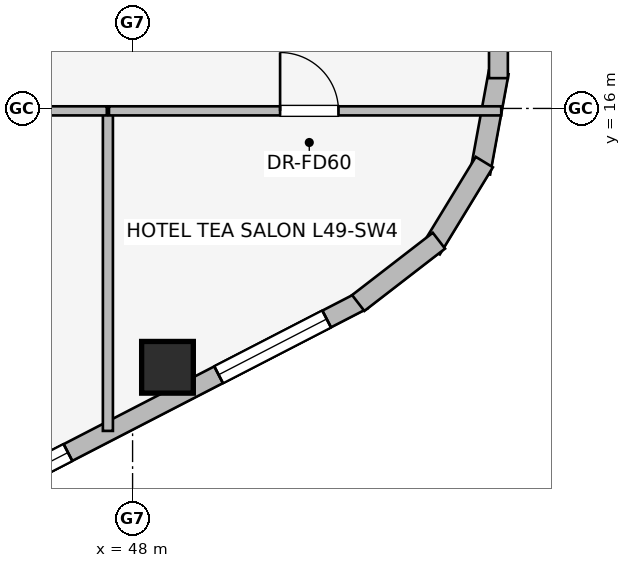
"""IFC4 building model, lengths in metres.
Left out: names, types, materials, properties, quantities, classifications, styles, units other than length and angle.
Written with IfcOpenShell. Run it as: python <this file> out.ifc"""

import sys

from ifc_helpers import new_model, si_unit, direction, frame, frame_2d, origin, origin_2d, place, context, subcontext, project, spatial, rectangle, extrude, element, fill, save


model = new_model("IFC4")
c1 = context("Model", 3, precision=1e-05, world=origin(), true_north=direction((0.0, 1.0)))
c2 = subcontext(c1, "Body", "Model", "MODEL_VIEW")
j1 = project(units=[si_unit("LENGTHUNIT", "METRE"), si_unit("PLANEANGLEUNIT", "RADIAN")], contexts=[c1])
p1 = place(None, origin())
s1 = spatial("IfcSite", under=j1, at=p1, CompositionType="ELEMENT")
p2 = place(p1, origin())
s2 = spatial("IfcBuilding", under=s1, at=p2, CompositionType="ELEMENT")
p3 = place(p2, frame((0.0, 0.0, 180.9)))
s3 = spatial("IfcBuildingStorey", under=s2, at=p3, CompositionType="ELEMENT", Elevation=180.9)
p4 = place(p3, frame((48.574, 11.743, 0.0), z_axis=(0.0, 0.0, 1.0), x_axis=(1.0, 0.0, 0.0)))
e1 = element("IfcColumn", 1, at=p4, inside=s3, PredefinedType="COLUMN", context=c2, shape_type="SweptSolid", body=[
    extrude(rectangle(XDim=0.85, YDim=0.85, at=origin_2d()), origin(), (0.0, 0.0, 1.0), 3.45),
])
p5 = place(p3, frame((51.792, 12.847, 0.0), z_axis=(0.0, 0.0, 1.0), x_axis=(-0.888626188278, -0.458632202867, 0.0)))
e2 = element("IfcWall", 2, at=p5, inside=s3, PredefinedType="STANDARD", context=c2, shape_type="SweptSolid", body=[
    extrude(rectangle(XDim=16.828, YDim=0.31, at=frame_2d((8.414, 0.0))), origin(), (0.0, 0.0, 1.0), 3.19),
])
p6 = place(p5, frame((0.675, 0.0, 0.75)))
e3 = element("IfcOpeningElement", 3, at=p6, cuts=e2, PredefinedType="OPENING", context=c2, shape_type="SweptSolid", body=[
    extrude(rectangle(XDim=2.0, YDim=1.5, at=frame_2d((1.0, 0.75))), frame((0.0, 0.165, 0.0), z_axis=(0.0, -1.0, 0.0), x_axis=(1.0, 0.0, 0.0)), (0.0, 0.0, 1.0), 0.33),
])
p7 = place(p5, frame((5.463, 0.0, 0.75)))
e4 = element("IfcOpeningElement", 4, at=p7, cuts=e2, PredefinedType="OPENING", context=c2, shape_type="SweptSolid", body=[
    extrude(rectangle(XDim=1.35, YDim=1.45, at=frame_2d((0.675, 0.725))), frame((0.0, 0.165, 0.0), z_axis=(0.0, -1.0, 0.0), x_axis=(1.0, 0.0, 0.0)), (0.0, 0.0, 1.0), 0.33),
])
p8 = place(p5, frame((7.58, 0.0, 0.75)))
e5 = element("IfcOpeningElement", 5, at=p8, cuts=e2, PredefinedType="OPENING", context=c2, shape_type="SweptSolid", body=[
    extrude(rectangle(XDim=1.35, YDim=1.45, at=frame_2d((0.675, 0.725))), frame((0.0, 0.165, 0.0), z_axis=(0.0, -1.0, 0.0), x_axis=(1.0, 0.0, 0.0)), (0.0, 0.0, 1.0), 0.33),
])
p9 = place(p5, frame((9.698, 0.0, 0.75)))
e6 = element("IfcOpeningElement", 6, at=p9, cuts=e2, PredefinedType="OPENING", context=c2, shape_type="SweptSolid", body=[
    extrude(rectangle(XDim=1.35, YDim=1.45, at=frame_2d((0.675, 0.725))), frame((0.0, 0.165, 0.0), z_axis=(0.0, -1.0, 0.0), x_axis=(1.0, 0.0, 0.0)), (0.0, 0.0, 1.0), 0.33),
])
p10 = place(p5, frame((14.563, 0.0, 0.75)))
e7 = element("IfcOpeningElement", 7, at=p10, cuts=e2, PredefinedType="OPENING", context=c2, shape_type="SweptSolid", body=[
    extrude(rectangle(XDim=1.05, YDim=1.4, at=frame_2d((0.525, 0.7))), frame((0.0, 0.165, 0.0), z_axis=(0.0, -1.0, 0.0), x_axis=(1.0, 0.0, 0.0)), (0.0, 0.0, 1.0), 0.33),
])
p11 = place(p3, frame((54.021, 16.592, 0.0), z_axis=(0.0, 0.0, 1.0), x_axis=(-0.180717642671, -0.983535019014, 0.0)))
e8 = element("IfcWall", 8, at=p11, inside=s3, PredefinedType="STANDARD", context=c2, shape_type="SweptSolid", body=[
    extrude(rectangle(XDim=1.677, YDim=0.33, at=frame_2d((0.838, 0.0))), origin(), (0.0, 0.0, 1.0), 3.19),
])
p12 = place(p3, frame((53.785, 15.118, 0.0), z_axis=(0.0, 0.0, 1.0), x_axis=(-0.520219286058, -0.85403272444, 0.0)))
e9 = element("IfcWall", 9, at=p12, inside=s3, PredefinedType="STANDARD", context=c2, shape_type="SweptSolid", body=[
    extrude(rectangle(XDim=1.678, YDim=0.33, at=frame_2d((0.839, 0.0))), origin(), (0.0, 0.0, 1.0), 3.19),
])
p13 = place(p3, frame((53.038, 13.825, 0.0), z_axis=(0.0, 0.0, 1.0), x_axis=(-0.791464279355, -0.611215423976, 0.0)))
e10 = element("IfcWall", 10, at=p13, inside=s3, PredefinedType="STANDARD", context=c2, shape_type="SweptSolid", body=[
    extrude(rectangle(XDim=1.677, YDim=0.33, at=frame_2d((0.838, 0.0))), origin(), (0.0, 0.0, 1.0), 3.19),
])
p14 = place(p3, frame((54.017, 31.502, 0.0), z_axis=(0.0, 0.0, 1.0), x_axis=(0.0, -1.0, 0.0)))
e11 = element("IfcWall", 11, at=p14, inside=s3, PredefinedType="STANDARD", context=c2, shape_type="SweptSolid", body=[
    extrude(rectangle(XDim=15.004, YDim=0.31, at=frame_2d((7.502, 0.0))), origin(), (0.0, 0.0, 1.0), 3.19),
])
p15 = place(p14, frame((4.353, 0.0, 0.75)))
e12 = element("IfcOpeningElement", 12, at=p15, cuts=e11, PredefinedType="OPENING", context=c2, shape_type="SweptSolid", body=[
    extrude(rectangle(XDim=2.0, YDim=1.5, at=frame_2d((1.0, 0.75))), frame((0.0, 0.165, 0.0), z_axis=(0.0, -1.0, 0.0), x_axis=(1.0, 0.0, 0.0)), (0.0, 0.0, 1.0), 0.33),
])
p16 = place(p14, frame((8.083, 0.0, 0.75)))
e13 = element("IfcOpeningElement", 13, at=p16, cuts=e11, PredefinedType="OPENING", context=c2, shape_type="SweptSolid", body=[
    extrude(rectangle(XDim=1.35, YDim=1.45, at=frame_2d((0.675, 0.725))), frame((0.0, 0.165, 0.0), z_axis=(0.0, -1.0, 0.0), x_axis=(1.0, 0.0, 0.0)), (0.0, 0.0, 1.0), 0.33),
])
p17 = place(p14, frame((9.87, 0.0, 0.75)))
e14 = element("IfcOpeningElement", 14, at=p17, cuts=e11, PredefinedType="OPENING", context=c2, shape_type="SweptSolid", body=[
    extrude(rectangle(XDim=1.35, YDim=1.45, at=frame_2d((0.675, 0.725))), frame((0.0, 0.165, 0.0), z_axis=(0.0, -1.0, 0.0), x_axis=(1.0, 0.0, 0.0)), (0.0, 0.0, 1.0), 0.33),
])
p18 = place(p3, frame((47.594, 10.697, 0.0), z_axis=(0.0, 0.0, 1.0), x_axis=(0.0, 1.0, 0.0)))
e15 = element("IfcWall", 15, at=p18, inside=s3, PredefinedType="PARTITIONING", context=c2, shape_type="SweptSolid", body=[
    extrude(rectangle(XDim=5.233, YDim=0.165, at=frame_2d((2.616, 0.0))), origin(), (0.0, 0.0, 1.0), 3.19),
])
p19 = place(p3, frame((41.323, 15.96, 0.0), z_axis=(0.0, 0.0, 1.0), x_axis=(1.0, 0.0, 0.0)))
e16 = element("IfcWall", 16, at=p19, inside=s3, PredefinedType="PARTITIONING", context=c2, shape_type="SweptSolid", body=[
    extrude(rectangle(XDim=6.253, YDim=0.15, at=frame_2d((3.126, 0.0))), origin(), (0.0, 0.0, 1.0), 3.19),
])
p20 = place(p19, frame((2.647, 0.0, 0.0)))
e17 = element("IfcOpeningElement", 17, at=p20, cuts=e16, PredefinedType="OPENING", context=c2, shape_type="SweptSolid", body=[
    extrude(rectangle(XDim=0.96, YDim=2.0, at=frame_2d((0.48, 1.0))), frame((0.0, 0.085, 0.0), z_axis=(0.0, -1.0, 0.0), x_axis=(1.0, 0.0, 0.0)), (0.0, 0.0, 1.0), 0.17),
])
p21 = place(p3, frame((47.612, 15.96, 0.0), z_axis=(0.0, 0.0, 1.0), x_axis=(1.0, 0.0, 0.0)))
e18 = element("IfcWall", 18, at=p21, inside=s3, PredefinedType="PARTITIONING", context=c2, shape_type="SweptSolid", body=[
    extrude(rectangle(XDim=6.451, YDim=0.15, at=frame_2d((3.226, 0.0))), origin(), (0.0, 0.0, 1.0), 3.19),
])
p22 = place(p21, frame((2.814, 0.0, 0.0)))
e19 = element("IfcOpeningElement", 19, at=p22, cuts=e18, PredefinedType="OPENING", context=c2, shape_type="SweptSolid", body=[
    extrude(rectangle(XDim=0.96, YDim=2.0, at=frame_2d((0.48, 1.0))), frame((0.0, 0.085, 0.0), z_axis=(0.0, -1.0, 0.0), x_axis=(1.0, 0.0, 0.0)), (0.0, 0.0, 1.0), 0.17),
])
p23 = place(p6, origin())
e20 = element("IfcWindow", 20, at=p23, inside=s3, PartitioningType="SINGLE_PANEL", PredefinedType="WINDOW", context=c2, shape_type="SweptSolid", body=[
    extrude(rectangle(XDim=2.0, YDim=1.5, at=frame_2d((1.0, 0.75))), frame((0.0, 0.03, 0.0), z_axis=(0.0, -1.0, 0.0), x_axis=(1.0, 0.0, 0.0)), (0.0, 0.0, 1.0), 0.06),
])
fill(e3, e20)
p24 = place(p7, origin())
e21 = element("IfcWindow", 21, at=p24, inside=s3, PartitioningType="SINGLE_PANEL", PredefinedType="WINDOW", context=c2, shape_type="SweptSolid", body=[
    extrude(rectangle(XDim=1.35, YDim=1.45, at=frame_2d((0.675, 0.725))), frame((0.0, 0.03, 0.0), z_axis=(0.0, -1.0, 0.0), x_axis=(1.0, 0.0, 0.0)), (0.0, 0.0, 1.0), 0.06),
])
fill(e4, e21)
p25 = place(p22, origin())
e22 = element("IfcDoor", 22, at=p25, inside=s3, OperationType="SINGLE_SWING_LEFT", PredefinedType="DOOR", context=c2, shape_type="SweptSolid", body=[
    extrude(rectangle(XDim=0.96, YDim=2.0, at=frame_2d((0.48, 1.0))), frame((0.0, 0.025, 0.0), z_axis=(0.0, -1.0, 0.0), x_axis=(1.0, 0.0, 0.0)), (0.0, 0.0, 1.0), 0.05),
])
fill(e19, e22)
save(model, sys.argv[1])
